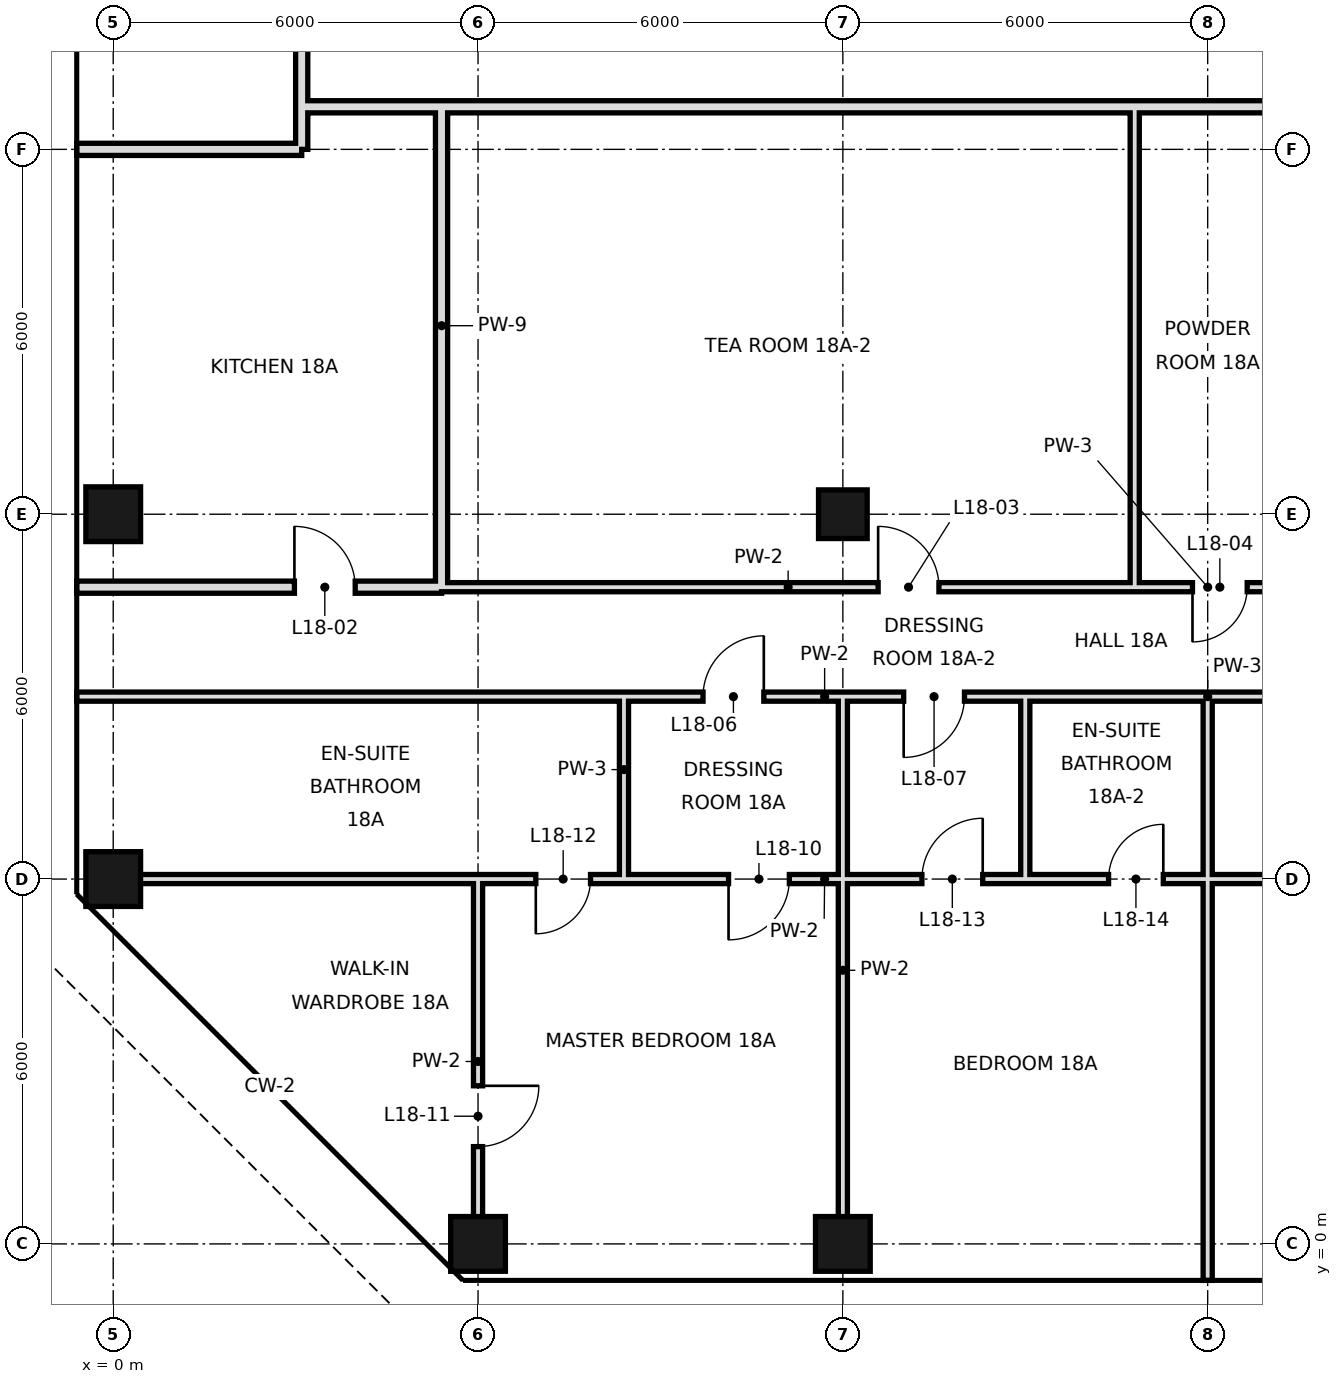
"""IFC4 building model, lengths in metres.
Left out: names, types, materials, properties, quantities, classifications, styles, units other than length and angle.
Written with IfcOpenShell. Run it as: python <this file> out.ifc"""

import sys

from ifc_helpers import new_model, si_unit, direction, frame, frame_2d, origin, origin_2d, place, context, subcontext, project, spatial, rectangle, hollow_rectangle, extrude, element, fill, save


model = new_model("IFC4")
c1 = context("Model", 3, precision=1e-05, world=origin(), true_north=direction((0.0, 1.0)))
c2 = subcontext(c1, "Body", "Model", "MODEL_VIEW")
j1 = project(units=[si_unit("LENGTHUNIT", "METRE"), si_unit("PLANEANGLEUNIT", "RADIAN")], contexts=[c1])
p1 = place(None, origin())
s1 = spatial("IfcSite", under=j1, at=p1, CompositionType="ELEMENT")
p2 = place(p1, origin())
s2 = spatial("IfcBuilding", under=s1, at=p2, CompositionType="ELEMENT")
p3 = place(p2, frame((0.0, 0.0, 85.8)))
s3 = spatial("IfcBuildingStorey", under=s2, at=p3, CompositionType="ELEMENT", Elevation=85.8)
for number, where, z_axis, x_axis in (
    (1, (0.0, 6.0, 0.0), (0.0, 0.0, 1.0), (1.0, 0.0, 0.0)),
    (2, (0.0, 12.0, 0.0), (0.0, 0.0, 1.0), (1.0, 0.0, 0.0)),
    (3, (6.0, 0.0, 0.0), (0.0, 0.0, 1.0), (1.0, 0.0, 0.0)),
    (4, (12.0, 0.0, 0.0), (0.0, 0.0, 1.0), (1.0, 0.0, 0.0)),
):
    element("IfcColumn", number, at=place(p3, frame(where, z_axis=z_axis, x_axis=x_axis)), inside=s3, PredefinedType="COLUMN", context=c2, shape_type="SweptSolid", body=[
        extrude(hollow_rectangle(XDim=0.9, YDim=0.9, WallThickness=0.045, at=origin_2d()), origin(), (0.0, 0.0, 1.0), 4.4),
    ])
p4 = place(p3, frame((12.0, 12.0, 0.0), z_axis=(0.0, 0.0, 1.0), x_axis=(1.0, 0.0, 0.0)))
e5 = element("IfcColumn", 5, at=p4, inside=s3, PredefinedType="COLUMN", context=c2, shape_type="SweptSolid", body=[
    extrude(hollow_rectangle(XDim=0.8, YDim=0.8, WallThickness=0.04, at=origin_2d()), origin(), (0.0, 0.0, 1.0), 4.4),
])
p5 = place(p3, frame((12.0, 0.0, 0.0), z_axis=(0.0, 0.0, 1.0), x_axis=(0.0, 1.0, 0.0)))
e6 = element("IfcWall", 6, at=p5, inside=s3, PredefinedType="PARTITIONING", context=c2, shape_type="SweptSolid", body=[
    extrude(rectangle(XDim=9.0, YDim=0.15, at=frame_2d((4.5, 0.0))), origin(), (0.0, 0.0, 1.0), 3.4),
])
p6 = place(p3, frame((15.0, 6.0, 0.0), z_axis=(0.0, 0.0, 1.0), x_axis=(0.0, 1.0, 0.0)))
e7 = element("IfcWall", 7, at=p6, inside=s3, PredefinedType="PARTITIONING", context=c2, shape_type="SweptSolid", body=[
    extrude(rectangle(XDim=3.0, YDim=0.15, at=frame_2d((1.5, 0.0))), origin(), (0.0, 0.0, 1.0), 4.1),
])
p7 = place(p3, frame((16.8, 10.8, 0.0), z_axis=(0.0, 0.0, 1.0), x_axis=(0.0, 1.0, 0.0)))
e8 = element("IfcWall", 8, at=p7, inside=s3, PredefinedType="PARTITIONING", context=c2, shape_type="SweptSolid", body=[
    extrude(rectangle(XDim=7.9, YDim=0.15, at=frame_2d((3.95, 0.0))), origin(), (0.0, 0.0, 1.0), 4.1),
])
p8 = place(p3, frame((18.0, -0.6, 0.0), z_axis=(0.0, 0.0, 1.0), x_axis=(0.0, 1.0, 0.0)))
e9 = element("IfcWall", 9, at=p8, inside=s3, PredefinedType="PARTITIONING", context=c2, shape_type="SweptSolid", body=[
    extrude(rectangle(XDim=6.6, YDim=0.15, at=frame_2d((3.3, 0.0))), origin(), (0.0, 0.0, 1.0), 3.4),
])
p9 = place(p3, frame((18.0, 6.0, 0.0), z_axis=(0.0, 0.0, 1.0), x_axis=(0.0, 1.0, 0.0)))
e10 = element("IfcWall", 10, at=p9, inside=s3, PredefinedType="PARTITIONING", context=c2, shape_type="SweptSolid", body=[
    extrude(rectangle(XDim=3.0, YDim=0.15, at=frame_2d((1.5, 0.0))), origin(), (0.0, 0.0, 1.0), 3.4),
])
p10 = place(p3, frame((3.1, 18.7, 0.0), z_axis=(0.0, 0.0, 1.0), x_axis=(0.0, 1.0, 0.0)))
e11 = element("IfcWall", 11, at=p10, inside=s3, PredefinedType="SOLIDWALL", context=c2, shape_type="SweptSolid", body=[
    extrude(rectangle(XDim=27.249, YDim=0.2, at=frame_2d((13.625, 0.0))), origin(), (0.0, 0.0, 1.0), 3.65),
])
p11 = place(p10, frame((12.6, 0.0, 0.0)))
e12 = element("IfcOpeningElement", 12, at=p11, cuts=e11, PredefinedType="OPENING", context=c2, shape_type="SweptSolid", body=[
    extrude(rectangle(XDim=1.2, YDim=2.4, at=frame_2d((0.6, 1.2))), frame((0.0, 0.11, 0.0), z_axis=(0.0, -1.0, 0.0), x_axis=(1.0, 0.0, 0.0)), (0.0, 0.0, 1.0), 0.22),
])
p12 = place(p3, frame((3.1, 18.0, 0.0), z_axis=(0.0, 0.0, 1.0), x_axis=(0.0, 1.0, 0.0)))
e13 = element("IfcWall", 13, at=p12, inside=s3, PredefinedType="SOLIDWALL", context=c2, shape_type="SweptSolid", body=[
    extrude(rectangle(XDim=0.7, YDim=0.2, at=frame_2d((0.35, 0.0))), origin(), (0.0, 0.0, 1.0), 3.65),
])
p13 = place(p3, frame((5.4, 10.8, 0.0), z_axis=(0.0, 0.0, 1.0), x_axis=(0.0, 1.0, 0.0)))
e14 = element("IfcWall", 14, at=p13, inside=s3, PredefinedType="SOLIDWALL", context=c2, shape_type="SweptSolid", body=[
    extrude(rectangle(XDim=7.9, YDim=0.2, at=frame_2d((3.95, 0.0))), origin(), (0.0, 0.0, 1.0), 3.4),
])
p14 = place(p3, frame((6.0, 0.0, 0.0), z_axis=(0.0, 0.0, 1.0), x_axis=(0.0, 1.0, 0.0)))
e15 = element("IfcWall", 15, at=p14, inside=s3, PredefinedType="PARTITIONING", context=c2, shape_type="SweptSolid", body=[
    extrude(rectangle(XDim=6.0, YDim=0.15, at=frame_2d((3.0, 0.0))), origin(), (0.0, 0.0, 1.0), 3.4),
])
p15 = place(p14, frame((1.6, 0.0, 0.0)))
e16 = element("IfcOpeningElement", 16, at=p15, cuts=e15, PredefinedType="OPENING", context=c2, shape_type="SweptSolid", body=[
    extrude(rectangle(XDim=1.0, YDim=2.4, at=frame_2d((0.5, 1.2))), frame((0.0, 0.085, 0.0), z_axis=(0.0, -1.0, 0.0), x_axis=(1.0, 0.0, 0.0)), (0.0, 0.0, 1.0), 0.17),
])
p16 = place(p3, frame((8.4, 6.0, 0.0), z_axis=(0.0, 0.0, 1.0), x_axis=(0.0, 1.0, 0.0)))
e17 = element("IfcWall", 17, at=p16, inside=s3, PredefinedType="PARTITIONING", context=c2, shape_type="SweptSolid", body=[
    extrude(rectangle(XDim=3.0, YDim=0.15, at=frame_2d((1.5, 0.0))), origin(), (0.0, 0.0, 1.0), 4.1),
])
p17 = place(p3, frame((-0.6, 10.8, 0.0), z_axis=(0.0, 0.0, 1.0), x_axis=(1.0, 0.0, 0.0)))
e18 = element("IfcWall", 18, at=p17, inside=s3, PredefinedType="SOLIDWALL", context=c2, shape_type="SweptSolid", body=[
    extrude(rectangle(XDim=6.0, YDim=0.2, at=frame_2d((3.0, 0.0))), origin(), (0.0, 0.0, 1.0), 3.65),
])
p18 = place(p17, frame((3.58, 0.0, 0.0)))
e19 = element("IfcOpeningElement", 19, at=p18, cuts=e18, PredefinedType="OPENING", context=c2, shape_type="SweptSolid", body=[
    extrude(rectangle(XDim=1.0, YDim=2.4, at=frame_2d((0.5, 1.2))), frame((0.0, 0.11, 0.0), z_axis=(0.0, -1.0, 0.0), x_axis=(1.0, 0.0, 0.0)), (0.0, 0.0, 1.0), 0.22),
])
p19 = place(p3, frame((5.4, 10.8, 0.0), z_axis=(0.0, 0.0, 1.0), x_axis=(1.0, 0.0, 0.0)))
e20 = element("IfcWall", 20, at=p19, inside=s3, PredefinedType="PARTITIONING", context=c2, shape_type="SweptSolid", body=[
    extrude(rectangle(XDim=11.4, YDim=0.15, at=frame_2d((5.7, 0.0))), origin(), (0.0, 0.0, 1.0), 4.1),
])
p20 = place(p19, frame((7.18, 0.0, 0.0)))
e21 = element("IfcOpeningElement", 21, at=p20, cuts=e20, PredefinedType="OPENING", context=c2, shape_type="SweptSolid", body=[
    extrude(rectangle(XDim=1.0, YDim=2.4, at=frame_2d((0.5, 1.2))), frame((0.0, 0.085, 0.0), z_axis=(0.0, -1.0, 0.0), x_axis=(1.0, 0.0, 0.0)), (0.0, 0.0, 1.0), 0.17),
])
p21 = place(p3, frame((16.8, 10.8, 0.0), z_axis=(0.0, 0.0, 1.0), x_axis=(1.0, 0.0, 0.0)))
e22 = element("IfcWall", 22, at=p21, inside=s3, PredefinedType="PARTITIONING", context=c2, shape_type="SweptSolid", body=[
    extrude(rectangle(XDim=2.4, YDim=0.15, at=frame_2d((1.2, 0.0))), origin(), (0.0, 0.0, 1.0), 4.1),
])
p22 = place(p21, frame((0.95, 0.0, 0.0)))
e23 = element("IfcOpeningElement", 23, at=p22, cuts=e22, PredefinedType="OPENING", context=c2, shape_type="SweptSolid", body=[
    extrude(rectangle(XDim=0.9, YDim=2.4, at=frame_2d((0.45, 1.2))), frame((0.0, 0.085, 0.0), z_axis=(0.0, -1.0, 0.0), x_axis=(1.0, 0.0, 0.0)), (0.0, 0.0, 1.0), 0.17),
])
p23 = place(p3, frame((-0.6, 18.0, 0.0), z_axis=(0.0, 0.0, 1.0), x_axis=(1.0, 0.0, 0.0)))
e24 = element("IfcWall", 24, at=p23, inside=s3, PredefinedType="SOLIDWALL", context=c2, shape_type="SweptSolid", body=[
    extrude(rectangle(XDim=3.7, YDim=0.2, at=frame_2d((1.85, 0.0))), origin(), (0.0, 0.0, 1.0), 3.4),
])
p24 = place(p3, frame((5.4, 18.7, 0.0), z_axis=(0.0, 0.0, 1.0), x_axis=(1.0, 0.0, 0.0)))
e25 = element("IfcWall", 25, at=p24, inside=s3, PredefinedType="SOLIDWALL", context=c2, shape_type="SweptSolid", body=[
    extrude(rectangle(XDim=37.8, YDim=0.2, at=frame_2d((18.9, 0.0))), origin(), (0.0, 0.0, 1.0), 3.4),
])
p25 = place(p24, frame((27.6, 0.0, 0.0)))
e26 = element("IfcOpeningElement", 26, at=p25, cuts=e25, PredefinedType="OPENING", context=c2, shape_type="SweptSolid", body=[
    extrude(rectangle(XDim=1.2, YDim=2.4, at=frame_2d((0.6, 1.2))), frame((0.0, 0.11, 0.0), z_axis=(0.0, -1.0, 0.0), x_axis=(1.0, 0.0, 0.0)), (0.0, 0.0, 1.0), 0.22),
])
p26 = place(p24, frame((32.4, 0.0, 0.0)))
e27 = element("IfcOpeningElement", 27, at=p26, cuts=e25, PredefinedType="OPENING", context=c2, shape_type="SweptSolid", body=[
    extrude(rectangle(XDim=1.2, YDim=2.4, at=frame_2d((0.6, 1.2))), frame((0.0, 0.11, 0.0), z_axis=(0.0, -1.0, 0.0), x_axis=(1.0, 0.0, 0.0)), (0.0, 0.0, 1.0), 0.22),
])
p27 = place(p3, frame((3.1, 18.7, 0.0), z_axis=(0.0, 0.0, 1.0), x_axis=(1.0, 0.0, 0.0)))
e28 = element("IfcWall", 28, at=p27, inside=s3, PredefinedType="SOLIDWALL", context=c2, shape_type="SweptSolid", body=[
    extrude(rectangle(XDim=2.3, YDim=0.2, at=frame_2d((1.15, 0.0))), origin(), (0.0, 0.0, 1.0), 4.1),
])
p28 = place(p3, frame((8.4, 6.0, 0.0), z_axis=(0.0, 0.0, 1.0), x_axis=(1.0, 0.0, 0.0)))
e29 = element("IfcWall", 29, at=p28, inside=s3, PredefinedType="PARTITIONING", context=c2, shape_type="SweptSolid", body=[
    extrude(rectangle(XDim=6.6, YDim=0.15, at=frame_2d((3.3, 0.0))), origin(), (0.0, 0.0, 1.0), 3.65),
])
p29 = place(p28, frame((1.72, 0.0, 0.0)))
e30 = element("IfcOpeningElement", 30, at=p29, cuts=e29, PredefinedType="OPENING", context=c2, shape_type="SweptSolid", body=[
    extrude(rectangle(XDim=1.0, YDim=2.4, at=frame_2d((0.5, 1.2))), frame((0.0, 0.085, 0.0), z_axis=(0.0, -1.0, 0.0), x_axis=(1.0, 0.0, 0.0)), (0.0, 0.0, 1.0), 0.17),
])
p30 = place(p28, frame((4.9, 0.0, 0.0)))
e31 = element("IfcOpeningElement", 31, at=p30, cuts=e29, PredefinedType="OPENING", context=c2, shape_type="SweptSolid", body=[
    extrude(rectangle(XDim=1.0, YDim=2.4, at=frame_2d((0.5, 1.2))), frame((0.0, 0.085, 0.0), z_axis=(0.0, -1.0, 0.0), x_axis=(1.0, 0.0, 0.0)), (0.0, 0.0, 1.0), 0.17),
])
p31 = place(p3, frame((18.0, 6.0, 0.0), z_axis=(0.0, 0.0, 1.0), x_axis=(1.0, 0.0, 0.0)))
e32 = element("IfcWall", 32, at=p31, inside=s3, PredefinedType="PARTITIONING", context=c2, shape_type="SweptSolid", body=[
    extrude(rectangle(XDim=12.0, YDim=0.15, at=frame_2d((6.0, 0.0))), origin(), (0.0, 0.0, 1.0), 3.65),
])
p32 = place(p31, frame((9.95, 0.0, 0.0)))
e33 = element("IfcOpeningElement", 33, at=p32, cuts=e32, PredefinedType="OPENING", context=c2, shape_type="SweptSolid", body=[
    extrude(rectangle(XDim=1.8, YDim=2.4, at=frame_2d((0.9, 1.2))), frame((0.0, 0.085, 0.0), z_axis=(0.0, -1.0, 0.0), x_axis=(1.0, 0.0, 0.0)), (0.0, 0.0, 1.0), 0.17),
])
p33 = place(p3, frame((0.0, 6.0, 0.0), z_axis=(0.0, 0.0, 1.0), x_axis=(1.0, 0.0, 0.0)))
e34 = element("IfcWall", 34, at=p33, inside=s3, PredefinedType="PARTITIONING", context=c2, shape_type="SweptSolid", body=[
    extrude(rectangle(XDim=8.4, YDim=0.15, at=frame_2d((4.2, 0.0))), origin(), (0.0, 0.0, 1.0), 3.65),
])
p34 = place(p33, frame((6.95, 0.0, 0.0)))
e35 = element("IfcOpeningElement", 35, at=p34, cuts=e34, PredefinedType="OPENING", context=c2, shape_type="SweptSolid", body=[
    extrude(rectangle(XDim=0.9, YDim=2.4, at=frame_2d((0.45, 1.2))), frame((0.0, 0.085, 0.0), z_axis=(0.0, -1.0, 0.0), x_axis=(1.0, 0.0, 0.0)), (0.0, 0.0, 1.0), 0.17),
])
p35 = place(p3, frame((15.0, 6.0, 0.0), z_axis=(0.0, 0.0, 1.0), x_axis=(1.0, 0.0, 0.0)))
e36 = element("IfcWall", 36, at=p35, inside=s3, PredefinedType="PARTITIONING", context=c2, shape_type="SweptSolid", body=[
    extrude(rectangle(XDim=3.0, YDim=0.15, at=frame_2d((1.5, 0.0))), origin(), (0.0, 0.0, 1.0), 3.65),
])
p36 = place(p35, frame((1.37, 0.0, 0.0)))
e37 = element("IfcOpeningElement", 37, at=p36, cuts=e36, PredefinedType="OPENING", context=c2, shape_type="SweptSolid", body=[
    extrude(rectangle(XDim=0.9, YDim=2.4, at=frame_2d((0.45, 1.2))), frame((0.0, 0.085, 0.0), z_axis=(0.0, -1.0, 0.0), x_axis=(1.0, 0.0, 0.0)), (0.0, 0.0, 1.0), 0.17),
])
p37 = place(p3, frame((8.4, 9.0, 0.0), z_axis=(0.0, 0.0, 1.0), x_axis=(1.0, 0.0, 0.0)))
e38 = element("IfcWall", 38, at=p37, inside=s3, PredefinedType="PARTITIONING", context=c2, shape_type="SweptSolid", body=[
    extrude(rectangle(XDim=6.6, YDim=0.15, at=frame_2d((3.3, 0.0))), origin(), (0.0, 0.0, 1.0), 4.1),
])
p38 = place(p37, frame((1.3, 0.0, 0.0)))
e39 = element("IfcOpeningElement", 39, at=p38, cuts=e38, PredefinedType="OPENING", context=c2, shape_type="SweptSolid", body=[
    extrude(rectangle(XDim=1.0, YDim=2.4, at=frame_2d((0.5, 1.2))), frame((0.0, 0.085, 0.0), z_axis=(0.0, -1.0, 0.0), x_axis=(1.0, 0.0, 0.0)), (0.0, 0.0, 1.0), 0.17),
])
p39 = place(p37, frame((4.6, 0.0, 0.0)))
e40 = element("IfcOpeningElement", 40, at=p39, cuts=e38, PredefinedType="OPENING", context=c2, shape_type="SweptSolid", body=[
    extrude(rectangle(XDim=1.0, YDim=2.4, at=frame_2d((0.5, 1.2))), frame((0.0, 0.085, 0.0), z_axis=(0.0, -1.0, 0.0), x_axis=(1.0, 0.0, 0.0)), (0.0, 0.0, 1.0), 0.17),
])
p40 = place(p3, frame((18.0, 9.0, 0.0), z_axis=(0.0, 0.0, 1.0), x_axis=(1.0, 0.0, 0.0)))
e41 = element("IfcWall", 41, at=p40, inside=s3, PredefinedType="PARTITIONING", context=c2, shape_type="SweptSolid", body=[
    extrude(rectangle(XDim=18.0, YDim=0.15, at=frame_2d((9.0, 0.0))), origin(), (0.0, 0.0, 1.0), 4.1),
])
p41 = place(p40, frame((3.16, 0.0, 0.0)))
e42 = element("IfcOpeningElement", 42, at=p41, cuts=e41, PredefinedType="OPENING", context=c2, shape_type="SweptSolid", body=[
    extrude(rectangle(XDim=1.8, YDim=2.4, at=frame_2d((0.9, 1.2))), frame((0.0, 0.085, 0.0), z_axis=(0.0, -1.0, 0.0), x_axis=(1.0, 0.0, 0.0)), (0.0, 0.0, 1.0), 0.17),
])
p42 = place(p40, frame((13.6, 0.0, 0.0)))
e43 = element("IfcOpeningElement", 43, at=p42, cuts=e41, PredefinedType="OPENING", context=c2, shape_type="SweptSolid", body=[
    extrude(rectangle(XDim=1.0, YDim=2.4, at=frame_2d((0.5, 1.2))), frame((0.0, 0.085, 0.0), z_axis=(0.0, -1.0, 0.0), x_axis=(1.0, 0.0, 0.0)), (0.0, 0.0, 1.0), 0.17),
])
p43 = place(p3, frame((-0.6, 9.0, 0.0), z_axis=(0.0, 0.0, 1.0), x_axis=(1.0, 0.0, 0.0)))
e44 = element("IfcWall", 44, at=p43, inside=s3, PredefinedType="PARTITIONING", context=c2, shape_type="SweptSolid", body=[
    extrude(rectangle(XDim=9.0, YDim=0.15, at=frame_2d((4.5, 0.0))), origin(), (0.0, 0.0, 1.0), 4.1),
])
p44 = place(p3, frame((15.0, 9.0, 0.0), z_axis=(0.0, 0.0, 1.0), x_axis=(1.0, 0.0, 0.0)))
e45 = element("IfcWall", 45, at=p44, inside=s3, PredefinedType="PARTITIONING", context=c2, shape_type="SweptSolid", body=[
    extrude(rectangle(XDim=3.0, YDim=0.15, at=frame_2d((1.5, 0.0))), origin(), (0.0, 0.0, 1.0), 4.1),
])
p45 = place(p18, origin())
e46 = element("IfcDoor", 46, at=p45, inside=s3, OperationType="SINGLE_SWING_LEFT", PredefinedType="DOOR", context=c2, shape_type="SweptSolid", body=[
    extrude(rectangle(XDim=1.0, YDim=2.4, at=frame_2d((0.5, 1.2))), frame((0.0, 0.025, 0.0), z_axis=(0.0, -1.0, 0.0), x_axis=(1.0, 0.0, 0.0)), (0.0, 0.0, 1.0), 0.05),
])
fill(e19, e46)
p46 = place(p20, origin())
e47 = element("IfcDoor", 47, at=p46, inside=s3, OperationType="SINGLE_SWING_LEFT", PredefinedType="DOOR", context=c2, shape_type="SweptSolid", body=[
    extrude(rectangle(XDim=1.0, YDim=2.4, at=frame_2d((0.5, 1.2))), frame((0.0, 0.025, 0.0), z_axis=(0.0, -1.0, 0.0), x_axis=(1.0, 0.0, 0.0)), (0.0, 0.0, 1.0), 0.05),
])
fill(e21, e47)
p47 = place(p22, frame((0.9, 0.0, 0.0), z_axis=(0.0, 0.0, 1.0), x_axis=(-1.0, 0.0, 0.0)))
e48 = element("IfcDoor", 48, at=p47, inside=s3, OperationType="SINGLE_SWING_RIGHT", PredefinedType="DOOR", context=c2, shape_type="SweptSolid", body=[
    extrude(rectangle(XDim=0.9, YDim=2.4, at=frame_2d((0.45, 1.2))), frame((0.0, 0.025, 0.0), z_axis=(0.0, -1.0, 0.0), x_axis=(1.0, 0.0, 0.0)), (0.0, 0.0, 1.0), 0.05),
])
fill(e23, e48)
p48 = place(p38, frame((1.0, 0.0, 0.0), z_axis=(0.0, 0.0, 1.0), x_axis=(-1.0, 0.0, 0.0)))
e49 = element("IfcDoor", 49, at=p48, inside=s3, OperationType="SINGLE_SWING_LEFT", PredefinedType="DOOR", context=c2, shape_type="SweptSolid", body=[
    extrude(rectangle(XDim=1.0, YDim=2.4, at=frame_2d((0.5, 1.2))), frame((0.0, 0.025, 0.0), z_axis=(0.0, -1.0, 0.0), x_axis=(1.0, 0.0, 0.0)), (0.0, 0.0, 1.0), 0.05),
])
fill(e39, e49)
p49 = place(p39, frame((1.0, 0.0, 0.0), z_axis=(0.0, 0.0, 1.0), x_axis=(-1.0, 0.0, 0.0)))
e50 = element("IfcDoor", 50, at=p49, inside=s3, OperationType="SINGLE_SWING_RIGHT", PredefinedType="DOOR", context=c2, shape_type="SweptSolid", body=[
    extrude(rectangle(XDim=1.0, YDim=2.4, at=frame_2d((0.5, 1.2))), frame((0.0, 0.025, 0.0), z_axis=(0.0, -1.0, 0.0), x_axis=(1.0, 0.0, 0.0)), (0.0, 0.0, 1.0), 0.05),
])
fill(e40, e50)
p50 = place(p29, frame((1.0, 0.0, 0.0), z_axis=(0.0, 0.0, 1.0), x_axis=(-1.0, 0.0, 0.0)))
e51 = element("IfcDoor", 51, at=p50, inside=s3, OperationType="SINGLE_SWING_RIGHT", PredefinedType="DOOR", context=c2, shape_type="SweptSolid", body=[
    extrude(rectangle(XDim=1.0, YDim=2.4, at=frame_2d((0.5, 1.2))), frame((0.0, 0.025, 0.0), z_axis=(0.0, -1.0, 0.0), x_axis=(1.0, 0.0, 0.0)), (0.0, 0.0, 1.0), 0.05),
])
fill(e30, e51)
p51 = place(p15, origin())
e52 = element("IfcDoor", 52, at=p51, inside=s3, OperationType="SINGLE_SWING_RIGHT", PredefinedType="DOOR", context=c2, shape_type="SweptSolid", body=[
    extrude(rectangle(XDim=1.0, YDim=2.4, at=frame_2d((0.5, 1.2))), frame((0.0, 0.025, 0.0), z_axis=(0.0, -1.0, 0.0), x_axis=(1.0, 0.0, 0.0)), (0.0, 0.0, 1.0), 0.05),
])
fill(e16, e52)
p52 = place(p34, frame((0.9, 0.0, 0.0), z_axis=(0.0, 0.0, 1.0), x_axis=(-1.0, 0.0, 0.0)))
e53 = element("IfcDoor", 53, at=p52, inside=s3, OperationType="SINGLE_SWING_RIGHT", PredefinedType="DOOR", context=c2, shape_type="SweptSolid", body=[
    extrude(rectangle(XDim=0.9, YDim=2.4, at=frame_2d((0.45, 1.2))), frame((0.0, 0.025, 0.0), z_axis=(0.0, -1.0, 0.0), x_axis=(1.0, 0.0, 0.0)), (0.0, 0.0, 1.0), 0.05),
])
fill(e35, e53)
p53 = place(p30, frame((1.0, 0.0, 0.0), z_axis=(0.0, 0.0, 1.0), x_axis=(-1.0, 0.0, 0.0)))
e54 = element("IfcDoor", 54, at=p53, inside=s3, OperationType="SINGLE_SWING_LEFT", PredefinedType="DOOR", context=c2, shape_type="SweptSolid", body=[
    extrude(rectangle(XDim=1.0, YDim=2.4, at=frame_2d((0.5, 1.2))), frame((0.0, 0.025, 0.0), z_axis=(0.0, -1.0, 0.0), x_axis=(1.0, 0.0, 0.0)), (0.0, 0.0, 1.0), 0.05),
])
fill(e31, e54)
p54 = place(p36, frame((0.9, 0.0, 0.0), z_axis=(0.0, 0.0, 1.0), x_axis=(-1.0, 0.0, 0.0)))
e55 = element("IfcDoor", 55, at=p54, inside=s3, OperationType="SINGLE_SWING_LEFT", PredefinedType="DOOR", context=c2, shape_type="SweptSolid", body=[
    extrude(rectangle(XDim=0.9, YDim=2.4, at=frame_2d((0.45, 1.2))), frame((0.0, 0.025, 0.0), z_axis=(0.0, -1.0, 0.0), x_axis=(1.0, 0.0, 0.0)), (0.0, 0.0, 1.0), 0.05),
])
fill(e37, e55)
save(model, sys.argv[1])
